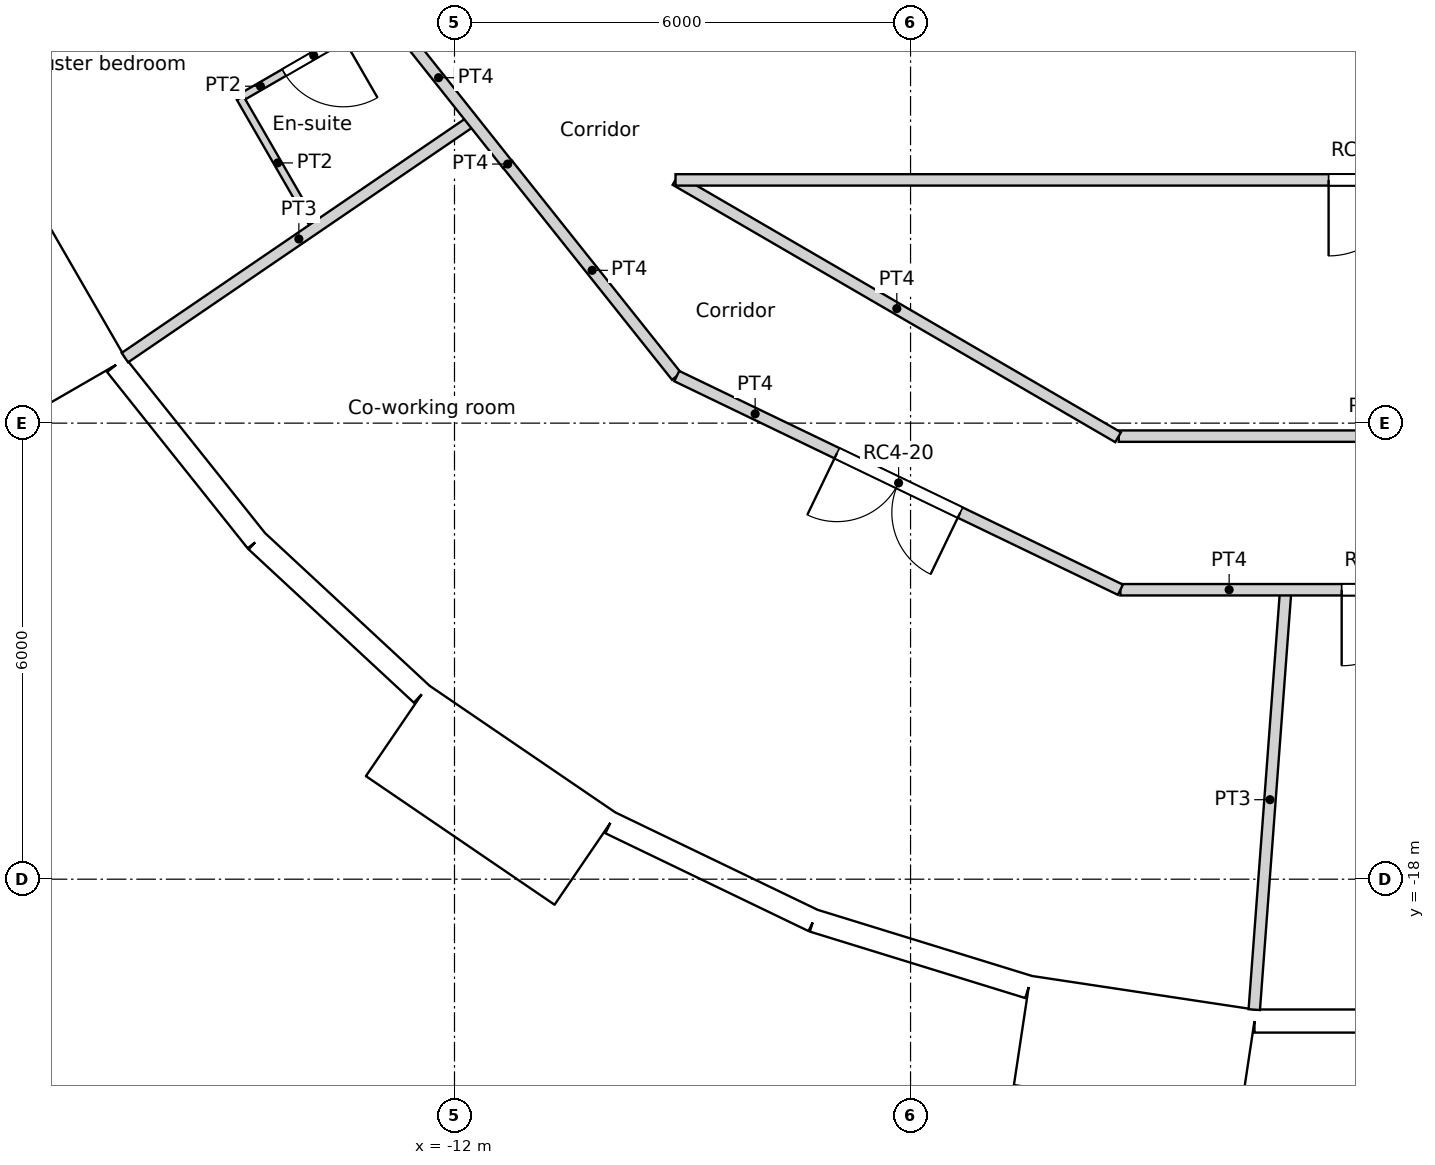
"""IFC4 building model, lengths in metres.
Left out: names, types, materials, properties, quantities, classifications, styles, units other than length and angle.
Written with IfcOpenShell. Run it as: python <this file> out.ifc"""

import sys

from ifc_helpers import new_model, si_unit, direction, frame, frame_2d, origin, origin_2d, place, context, subcontext, project, spatial, rectangle, circle, extrude, element, fill, save


model = new_model("IFC4")
c1 = context("Model", 3, precision=1e-05, world=origin(), true_north=direction((0.0, 1.0)))
c2 = subcontext(c1, "Body", "Model", "MODEL_VIEW")
j1 = project(units=[si_unit("LENGTHUNIT", "METRE"), si_unit("PLANEANGLEUNIT", "RADIAN")], contexts=[c1])
p1 = place(None, origin())
s1 = spatial("IfcSite", under=j1, at=p1, CompositionType="ELEMENT")
p2 = place(p1, origin())
s2 = spatial("IfcBuilding", under=s1, at=p2, CompositionType="ELEMENT")
p3 = place(p2, frame((0.0, 0.0, 263.4)))
s3 = spatial("IfcBuildingStorey", under=s2, at=p3, CompositionType="ELEMENT", Elevation=263.4)
for number, where, z_axis, x_axis in (
    (1, (-16.958, -8.167, 0.0), (0.0, 0.0, 1.0), (1.0, 0.0, 0.0)),
    (2, (-13.798, -12.802, 0.0), (0.0, 0.0, 1.0), (1.0, 0.0, 0.0)),
    (3, (-9.411, -16.301, 0.0), (0.0, 0.0, 1.0), (1.0, 0.0, 0.0)),
    (4, (-4.188, -18.35, 0.0), (0.0, 0.0, 1.0), (1.0, 0.0, 0.0)),
):
    element("IfcColumn", number, at=place(p3, frame(where, z_axis=z_axis, x_axis=x_axis)), inside=s3, PredefinedType="COLUMN", context=c2, shape_type="SweptSolid", body=[
        extrude(circle(Radius=0.55, at=origin_2d()), origin(), (0.0, 0.0, 1.0), 3.6),
    ])
p4 = place(p3, frame((-18.452, -8.921, -0.35), z_axis=(0.0, 0.0, 1.0), x_axis=(0.499990139034, -0.866031096941, 0.0)))
e5 = element("IfcWall", 5, at=p4, inside=s3, PredefinedType="ELEMENTEDWALL", context=c2, shape_type="SweptSolid", body=[
    extrude(rectangle(XDim=3.0, YDim=1.45, at=frame_2d((1.5, 0.0))), origin(), (0.0, 0.0, 1.0), 3.6),
])
p5 = place(p4, frame((1.5, 0.0, 1.9)))
e6 = element("IfcOpeningElement", 6, at=p5, cuts=e5, PredefinedType="OPENING", context=c2, shape_type="SweptSolid", body=[
    extrude(circle(Radius=0.9, at=origin_2d()), frame((0.0, 0.735, 0.0), z_axis=(0.0, -1.0, 0.0), x_axis=(1.0, 0.0, 0.0)), (0.0, 0.0, 1.0), 1.47),
])
p6 = place(p3, frame((-16.451, -11.234, 0.0), z_axis=(0.0, 0.0, 1.0), x_axis=(0.623498236992, -0.781824755599, 0.0)))
e7 = element("IfcWall", 7, at=p6, inside=s3, PredefinedType="SOLIDWALL", context=c2, shape_type="SweptSolid", body=[
    extrude(rectangle(XDim=2.962, YDim=0.3, at=frame_2d((1.481, 0.0))), origin(), (0.0, 0.0, 1.0), 3.25),
])
p7 = place(p6, frame((1.481, 0.0, 1.55)))
e8 = element("IfcOpeningElement", 8, at=p7, cuts=e7, PredefinedType="OPENING", context=c2, shape_type="SweptSolid", body=[
    extrude(circle(Radius=0.9, at=origin_2d()), frame((0.0, 0.16, 0.0), z_axis=(0.0, -1.0, 0.0), x_axis=(1.0, 0.0, 0.0)), (0.0, 0.0, 1.0), 0.32),
])
p8 = place(p3, frame((-14.604, -13.55, 0.0), z_axis=(0.0, 0.0, 1.0), x_axis=(0.733066412643, -0.680157066165, 0.0)))
e9 = element("IfcWall", 9, at=p8, inside=s3, PredefinedType="SOLIDWALL", context=c2, shape_type="SweptSolid", body=[
    extrude(rectangle(XDim=2.962, YDim=0.3, at=frame_2d((1.481, 0.0))), origin(), (0.0, 0.0, 1.0), 3.25),
])
p9 = place(p8, frame((1.481, 0.0, 1.55)))
e10 = element("IfcOpeningElement", 10, at=p9, cuts=e9, PredefinedType="OPENING", context=c2, shape_type="SweptSolid", body=[
    extrude(circle(Radius=0.9, at=origin_2d()), frame((0.0, 0.16, 0.0), z_axis=(0.0, -1.0, 0.0), x_axis=(1.0, 0.0, 0.0)), (0.0, 0.0, 1.0), 0.32),
])
p10 = place(p3, frame((-12.754, -16.044, -0.35), z_axis=(0.0, 0.0, 1.0), x_axis=(0.826246281157, -0.563309047392, 0.0)))
e11 = element("IfcWall", 11, at=p10, inside=s3, PredefinedType="ELEMENTEDWALL", context=c2, shape_type="SweptSolid", body=[
    extrude(rectangle(XDim=3.0, YDim=1.45, at=frame_2d((1.5, 0.0))), origin(), (0.0, 0.0, 1.0), 3.6),
])
p11 = place(p10, frame((1.5, 0.0, 1.9)))
e12 = element("IfcOpeningElement", 12, at=p11, cuts=e11, PredefinedType="OPENING", context=c2, shape_type="SweptSolid", body=[
    extrude(circle(Radius=0.9, at=origin_2d()), frame((0.0, 0.735, 0.0), z_axis=(0.0, -1.0, 0.0), x_axis=(1.0, 0.0, 0.0)), (0.0, 0.0, 1.0), 1.47),
])
p12 = place(p3, frame((-9.947, -17.259, 0.0), z_axis=(0.0, 0.0, 1.0), x_axis=(0.900939615635, -0.433944476838, 0.0)))
e13 = element("IfcWall", 13, at=p12, inside=s3, PredefinedType="SOLIDWALL", context=c2, shape_type="SweptSolid", body=[
    extrude(rectangle(XDim=2.962, YDim=0.3, at=frame_2d((1.481, 0.0))), origin(), (0.0, 0.0, 1.0), 3.25),
])
p13 = place(p12, frame((1.481, 0.0, 1.55)))
e14 = element("IfcOpeningElement", 14, at=p13, cuts=e13, PredefinedType="OPENING", context=c2, shape_type="SweptSolid", body=[
    extrude(circle(Radius=0.9, at=origin_2d()), frame((0.0, 0.16, 0.0), z_axis=(0.0, -1.0, 0.0), x_axis=(1.0, 0.0, 0.0)), (0.0, 0.0, 1.0), 0.32),
])
p14 = place(p3, frame((-7.278, -18.545, 0.0), z_axis=(0.0, 0.0, 1.0), x_axis=(0.95558635705, -0.294711238707, 0.0)))
e15 = element("IfcWall", 15, at=p14, inside=s3, PredefinedType="SOLIDWALL", context=c2, shape_type="SweptSolid", body=[
    extrude(rectangle(XDim=2.962, YDim=0.3, at=frame_2d((1.481, 0.0))), origin(), (0.0, 0.0, 1.0), 3.25),
])
p15 = place(p14, frame((1.481, 0.0, 1.55)))
e16 = element("IfcOpeningElement", 16, at=p15, cuts=e15, PredefinedType="OPENING", context=c2, shape_type="SweptSolid", body=[
    extrude(circle(Radius=0.9, at=origin_2d()), frame((0.0, 0.16, 0.0), z_axis=(0.0, -1.0, 0.0), x_axis=(1.0, 0.0, 0.0)), (0.0, 0.0, 1.0), 0.32),
])
p16 = place(p3, frame((-4.53, -19.989, -0.35), z_axis=(0.0, 0.0, 1.0), x_axis=(0.988836445254, -0.149004981587, 0.0)))
e17 = element("IfcWall", 17, at=p16, inside=s3, PredefinedType="ELEMENTEDWALL", context=c2, shape_type="SweptSolid", body=[
    extrude(rectangle(XDim=3.0, YDim=1.45, at=frame_2d((1.5, 0.0))), origin(), (0.0, 0.0, 1.0), 3.6),
])
p17 = place(p16, frame((1.5, 0.0, 1.9)))
e18 = element("IfcOpeningElement", 18, at=p17, cuts=e17, PredefinedType="OPENING", context=c2, shape_type="SweptSolid", body=[
    extrude(circle(Radius=0.9, at=origin_2d()), frame((0.0, 0.735, 0.0), z_axis=(0.0, -1.0, 0.0), x_axis=(1.0, 0.0, 0.0)), (0.0, 0.0, 1.0), 1.47),
])
p18 = place(p3, frame((-1.473, -19.866, 0.0), z_axis=(0.0, 0.0, 1.0), x_axis=(1.0, 0.0, 0.0)))
e19 = element("IfcWall", 19, at=p18, inside=s3, PredefinedType="SOLIDWALL", context=c2, shape_type="SweptSolid", body=[
    extrude(rectangle(XDim=2.962, YDim=0.3, at=frame_2d((1.481, 0.0))), origin(), (0.0, 0.0, 1.0), 3.25),
])
p19 = place(p18, frame((1.481, 0.0, 1.55)))
e20 = element("IfcOpeningElement", 20, at=p19, cuts=e19, PredefinedType="OPENING", context=c2, shape_type="SweptSolid", body=[
    extrude(circle(Radius=0.9, at=origin_2d()), frame((0.0, 0.16, 0.0), z_axis=(0.0, -1.0, 0.0), x_axis=(1.0, 0.0, 0.0)), (0.0, 0.0, 1.0), 0.32),
])
p20 = place(p3, frame((-9.092, -8.8, 0.0), z_axis=(0.0, 0.0, 1.0), x_axis=(1.0, 0.0, 0.0)))
e21 = element("IfcWall", 21, at=p20, inside=s3, PredefinedType="PARTITIONING", context=c2, shape_type="SweptSolid", body=[
    extrude(rectangle(XDim=18.193, YDim=0.15, at=frame_2d((9.096, 0.0))), origin(), (0.0, 0.0, 1.0), 3.25),
])
p21 = place(p20, frame((8.592, 0.0, 0.0)))
e22 = element("IfcOpeningElement", 22, at=p21, cuts=e21, PredefinedType="OPENING", context=c2, shape_type="SweptSolid", body=[
    extrude(rectangle(XDim=1.0, YDim=2.04, at=frame_2d((0.5, 1.02))), frame((0.0, 0.075, 0.0), z_axis=(0.0, -1.0, 0.0), x_axis=(1.0, 0.0, 0.0)), (0.0, 0.0, 1.0), 0.15),
])
p22 = place(p3, frame((-9.092, -8.8, 0.0), z_axis=(0.0, 0.0, 1.0), x_axis=(0.864470922103, -0.502682827277, 0.0)))
e23 = element("IfcWall", 23, at=p22, inside=s3, PredefinedType="PARTITIONING", context=c2, shape_type="SweptSolid", body=[
    extrude(rectangle(XDim=6.735, YDim=0.15, at=frame_2d((3.368, 0.0))), origin(), (0.0, 0.0, 1.0), 3.25),
])
p23 = place(p3, frame((-11.3, -8.596, 0.0), z_axis=(0.0, 0.0, 1.0), x_axis=(0.623165080354, -0.782090328944, 0.0)))
e24 = element("IfcWall", 24, at=p23, inside=s3, PredefinedType="PARTITIONING", context=c2, shape_type="SweptSolid", body=[
    extrude(rectangle(XDim=3.564, YDim=0.15, at=frame_2d((1.782, 0.0))), origin(), (0.0, 0.0, 1.0), 3.25),
])
p24 = place(p3, frame((-11.3, -8.596, 0.0), z_axis=(0.0, 0.0, 1.0), x_axis=(0.0, 1.0, 0.0)))
e25 = element("IfcWall", 25, at=p24, inside=s3, PredefinedType="PARTITIONING", context=c2, shape_type="SweptSolid", body=[
    extrude(rectangle(XDim=0.009, YDim=0.15, at=frame_2d((0.005, 0.0))), origin(), (0.0, 0.0, 1.0), 3.25),
])
p25 = place(p3, frame((-13.115, -6.316, 0.0), z_axis=(0.0, 0.0, 1.0), x_axis=(0.622042479172, -0.782983495423, 0.0)))
e26 = element("IfcWall", 26, at=p25, inside=s3, PredefinedType="PARTITIONING", context=c2, shape_type="SweptSolid", body=[
    extrude(rectangle(XDim=2.911, YDim=0.15, at=frame_2d((1.456, 0.0))), origin(), (0.0, 0.0, 1.0), 3.25),
])
p26 = place(p3, frame((-3.261, -12.171, 0.0), z_axis=(0.0, 0.0, 1.0), x_axis=(1.0, 0.0, 0.0)))
e27 = element("IfcWall", 27, at=p26, inside=s3, PredefinedType="PARTITIONING", context=c2, shape_type="SweptSolid", body=[
    extrude(rectangle(XDim=6.522, YDim=0.15, at=frame_2d((3.261, 0.0))), origin(), (0.0, 0.0, 1.0), 3.25),
])
p27 = place(p3, frame((-3.239, -14.192, 0.0), z_axis=(0.0, 0.0, 1.0), x_axis=(1.0, 0.0, 0.0)))
e28 = element("IfcWall", 28, at=p27, inside=s3, PredefinedType="PARTITIONING", context=c2, shape_type="SweptSolid", body=[
    extrude(rectangle(XDim=6.478, YDim=0.15, at=frame_2d((3.239, 0.0))), origin(), (0.0, 0.0, 1.0), 3.25),
])
p28 = place(p27, frame((2.911, 0.0, 0.0)))
e29 = element("IfcOpeningElement", 29, at=p28, cuts=e28, PredefinedType="OPENING", context=c2, shape_type="SweptSolid", body=[
    extrude(rectangle(XDim=1.0, YDim=2.1, at=frame_2d((0.5, 1.05))), frame((0.0, 0.075, 0.0), z_axis=(0.0, -1.0, 0.0), x_axis=(1.0, 0.0, 0.0)), (0.0, 0.0, 1.0), 0.15),
])
p29 = place(p3, frame((-9.076, -11.381, 0.0), z_axis=(0.0, 0.0, 1.0), x_axis=(0.900976027191, -0.433868872388, 0.0)))
e30 = element("IfcWall", 30, at=p29, inside=s3, PredefinedType="PARTITIONING", context=c2, shape_type="SweptSolid", body=[
    extrude(rectangle(XDim=6.479, YDim=0.15, at=frame_2d((3.239, 0.0))), origin(), (0.0, 0.0, 1.0), 3.25),
])
p30 = place(p29, frame((2.34, 0.0, 0.0)))
e31 = element("IfcOpeningElement", 31, at=p30, cuts=e30, PredefinedType="OPENING", context=c2, shape_type="SweptSolid", body=[
    extrude(rectangle(XDim=1.8, YDim=2.1, at=frame_2d((0.9, 1.05))), frame((0.0, 0.075, 0.0), z_axis=(0.0, -1.0, 0.0), x_axis=(1.0, 0.0, 0.0)), (0.0, 0.0, 1.0), 0.15),
])
p31 = place(p3, frame((-14.82, -7.722, 0.0), z_axis=(0.0, 0.0, 1.0), x_axis=(0.866076416361, 0.499911633214, 0.0)))
e32 = element("IfcWall", 32, at=p31, inside=s3, PredefinedType="PARTITIONING", context=c2, shape_type="SweptSolid", body=[
    extrude(rectangle(XDim=2.234, YDim=0.1, at=frame_2d((1.117, 0.0))), origin(), (0.0, 0.0, 1.0), 3.25),
])
p32 = place(p31, frame((0.667, 0.0, 0.0)))
e33 = element("IfcOpeningElement", 33, at=p32, cuts=e32, PredefinedType="OPENING", context=c2, shape_type="SweptSolid", body=[
    extrude(rectangle(XDim=0.9, YDim=2.04, at=frame_2d((0.45, 1.02))), frame((0.0, 0.05, 0.0), z_axis=(0.0, -1.0, 0.0), x_axis=(1.0, 0.0, 0.0)), (0.0, 0.0, 1.0), 0.1),
])
p33 = place(p3, frame((-14.82, -7.722, 0.0), z_axis=(0.0, 0.0, 1.0), x_axis=(0.500143626598, -0.865942465048, 0.0)))
e34 = element("IfcWall", 34, at=p33, inside=s3, PredefinedType="PARTITIONING", context=c2, shape_type="SweptSolid", body=[
    extrude(rectangle(XDim=1.974, YDim=0.1, at=frame_2d((0.987, 0.0))), origin(), (0.0, 0.0, 1.0), 3.25),
])
p34 = place(p3, frame((-16.336, -11.138, 0.0), z_axis=(0.0, 0.0, 1.0), x_axis=(0.82615274451, 0.563446219917, 0.0)))
e35 = element("IfcWall", 35, at=p34, inside=s3, PredefinedType="PARTITIONING", context=c2, shape_type="SweptSolid", body=[
    extrude(rectangle(XDim=5.54, YDim=0.15, at=frame_2d((2.77, 0.0))), origin(), (0.0, 0.0, 1.0), 3.25),
])
p35 = place(p3, frame((-1.478, -19.716, 0.0), z_axis=(0.0, 0.0, 1.0), x_axis=(0.074745027699, 0.997202677912, 0.0)))
e36 = element("IfcWall", 36, at=p35, inside=s3, PredefinedType="PARTITIONING", context=c2, shape_type="SweptSolid", body=[
    extrude(rectangle(XDim=5.54, YDim=0.15, at=frame_2d((2.77, 0.0))), origin(), (0.0, 0.0, 1.0), 3.25),
])
p36 = place(p5, origin())
e37 = element("IfcWindow", 37, at=p36, inside=s3, PartitioningType="SINGLE_PANEL", PredefinedType="WINDOW", context=c2, shape_type="SweptSolid", body=[
    extrude(circle(Radius=0.9, at=origin_2d()), frame((0.0, 0.695, 0.0), z_axis=(0.0, -1.0, 0.0), x_axis=(1.0, 0.0, 0.0)), (0.0, 0.0, 1.0), 0.1),
])
fill(e6, e37)
p37 = place(p7, origin())
e38 = element("IfcWindow", 38, at=p37, inside=s3, PartitioningType="SINGLE_PANEL", PredefinedType="WINDOW", context=c2, shape_type="SweptSolid", body=[
    extrude(circle(Radius=0.9, at=origin_2d()), frame((0.0, 0.12, 0.0), z_axis=(0.0, -1.0, 0.0), x_axis=(1.0, 0.0, 0.0)), (0.0, 0.0, 1.0), 0.1),
])
fill(e8, e38)
p38 = place(p9, origin())
e39 = element("IfcWindow", 39, at=p38, inside=s3, PartitioningType="SINGLE_PANEL", PredefinedType="WINDOW", context=c2, shape_type="SweptSolid", body=[
    extrude(circle(Radius=0.9, at=origin_2d()), frame((0.0, 0.12, 0.0), z_axis=(0.0, -1.0, 0.0), x_axis=(1.0, 0.0, 0.0)), (0.0, 0.0, 1.0), 0.1),
])
fill(e10, e39)
p39 = place(p11, origin())
e40 = element("IfcWindow", 40, at=p39, inside=s3, PartitioningType="SINGLE_PANEL", PredefinedType="WINDOW", context=c2, shape_type="SweptSolid", body=[
    extrude(circle(Radius=0.9, at=origin_2d()), frame((0.0, 0.695, 0.0), z_axis=(0.0, -1.0, 0.0), x_axis=(1.0, 0.0, 0.0)), (0.0, 0.0, 1.0), 0.1),
])
fill(e12, e40)
p40 = place(p13, origin())
e41 = element("IfcWindow", 41, at=p40, inside=s3, PartitioningType="SINGLE_PANEL", PredefinedType="WINDOW", context=c2, shape_type="SweptSolid", body=[
    extrude(circle(Radius=0.9, at=origin_2d()), frame((0.0, 0.12, 0.0), z_axis=(0.0, -1.0, 0.0), x_axis=(1.0, 0.0, 0.0)), (0.0, 0.0, 1.0), 0.1),
])
fill(e14, e41)
p41 = place(p15, origin())
e42 = element("IfcWindow", 42, at=p41, inside=s3, PartitioningType="SINGLE_PANEL", PredefinedType="WINDOW", context=c2, shape_type="SweptSolid", body=[
    extrude(circle(Radius=0.9, at=origin_2d()), frame((0.0, 0.12, 0.0), z_axis=(0.0, -1.0, 0.0), x_axis=(1.0, 0.0, 0.0)), (0.0, 0.0, 1.0), 0.1),
])
fill(e16, e42)
p42 = place(p17, origin())
e43 = element("IfcWindow", 43, at=p42, inside=s3, PartitioningType="SINGLE_PANEL", PredefinedType="WINDOW", context=c2, shape_type="SweptSolid", body=[
    extrude(circle(Radius=0.9, at=origin_2d()), frame((0.0, 0.695, 0.0), z_axis=(0.0, -1.0, 0.0), x_axis=(1.0, 0.0, 0.0)), (0.0, 0.0, 1.0), 0.1),
])
fill(e18, e43)
p43 = place(p19, origin())
e44 = element("IfcWindow", 44, at=p43, inside=s3, PartitioningType="SINGLE_PANEL", PredefinedType="WINDOW", context=c2, shape_type="SweptSolid", body=[
    extrude(circle(Radius=0.9, at=origin_2d()), frame((0.0, 0.12, 0.0), z_axis=(0.0, -1.0, 0.0), x_axis=(1.0, 0.0, 0.0)), (0.0, 0.0, 1.0), 0.1),
])
fill(e20, e44)
p44 = place(p21, origin())
e45 = element("IfcDoor", 45, at=p44, inside=s3, OperationType="SINGLE_SWING_RIGHT", PredefinedType="DOOR", context=c2, shape_type="SweptSolid", body=[
    extrude(rectangle(XDim=1.0, YDim=2.04, at=frame_2d((0.5, 1.02))), frame((0.0, 0.025, 0.0), z_axis=(0.0, -1.0, 0.0), x_axis=(1.0, 0.0, 0.0)), (0.0, 0.0, 1.0), 0.05),
])
fill(e22, e45)
p45 = place(p32, origin())
e46 = element("IfcDoor", 46, at=p45, inside=s3, OperationType="SINGLE_SWING_LEFT", PredefinedType="DOOR", context=c2, shape_type="SweptSolid", body=[
    extrude(rectangle(XDim=0.9, YDim=2.04, at=frame_2d((0.45, 1.02))), frame((0.0, 0.025, 0.0), z_axis=(0.0, -1.0, 0.0), x_axis=(1.0, 0.0, 0.0)), (0.0, 0.0, 1.0), 0.05),
])
fill(e33, e46)
p46 = place(p30, origin())
e47 = element("IfcDoor", 47, at=p46, inside=s3, OperationType="DOUBLE_DOOR_SINGLE_SWING", PredefinedType="DOOR", context=c2, shape_type="SweptSolid", body=[
    extrude(rectangle(XDim=1.8, YDim=2.1, at=frame_2d((0.9, 1.05))), frame((0.0, 0.025, 0.0), z_axis=(0.0, -1.0, 0.0), x_axis=(1.0, 0.0, 0.0)), (0.0, 0.0, 1.0), 0.05),
])
fill(e31, e47)
p47 = place(p28, origin())
e48 = element("IfcDoor", 48, at=p47, inside=s3, OperationType="SINGLE_SWING_RIGHT", PredefinedType="DOOR", context=c2, shape_type="SweptSolid", body=[
    extrude(rectangle(XDim=1.0, YDim=2.1, at=frame_2d((0.5, 1.05))), frame((0.0, 0.025, 0.0), z_axis=(0.0, -1.0, 0.0), x_axis=(1.0, 0.0, 0.0)), (0.0, 0.0, 1.0), 0.05),
])
fill(e29, e48)
save(model, sys.argv[1])
